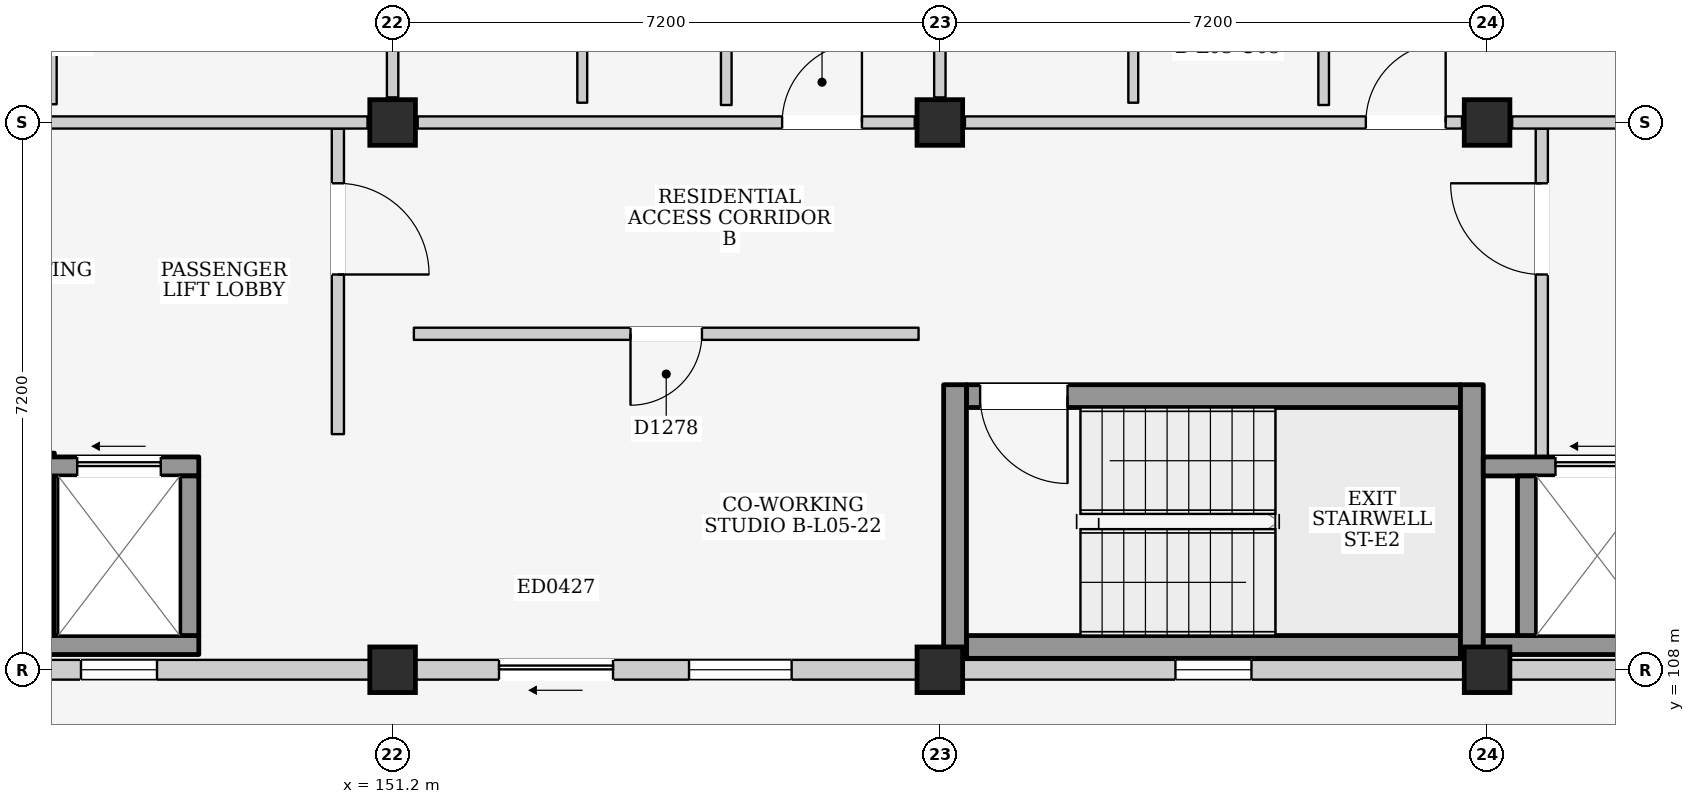
"""IFC4 building model, lengths in metres.
Left out: names, types, materials, properties, quantities, classifications, styles, units other than length and angle.
Written with IfcOpenShell. Run it as: python <this file> out.ifc"""

import sys

from ifc_helpers import new_model, si_unit, direction, frame, frame_2d, origin, origin_2d, place, context, subcontext, project, spatial, rectangle, extrude, element, fill, save


model = new_model("IFC4")
c1 = context("Model", 3, precision=1e-05, world=origin(), true_north=direction((0.0, 1.0)))
c2 = subcontext(c1, "Body", "Model", "MODEL_VIEW")
j1 = project(units=[si_unit("LENGTHUNIT", "METRE"), si_unit("PLANEANGLEUNIT", "RADIAN")], contexts=[c1])
p1 = place(None, origin())
s1 = spatial("IfcSite", under=j1, at=p1, CompositionType="ELEMENT")
p2 = place(p1, origin())
s2 = spatial("IfcBuilding", under=s1, at=p2, CompositionType="ELEMENT")
p3 = place(p2, frame((0.0, 0.0, 18.6)))
s3 = spatial("IfcBuildingStorey", under=s2, at=p3, CompositionType="ELEMENT", Elevation=18.6)
for number, where, z_axis, x_axis in (
    (1, (151.2, 108.0, 0.0), (0.0, 0.0, 1.0), (1.0, 0.0, 0.0)),
    (2, (151.2, 115.2, 0.0), (0.0, 0.0, 1.0), (1.0, 0.0, 0.0)),
    (3, (158.4, 108.0, 0.0), (0.0, 0.0, 1.0), (1.0, 0.0, 0.0)),
    (4, (158.4, 115.2, 0.0), (0.0, 0.0, 1.0), (1.0, 0.0, 0.0)),
    (5, (165.6, 108.0, 0.0), (0.0, 0.0, 1.0), (1.0, 0.0, 0.0)),
    (6, (165.6, 115.2, 0.0), (0.0, 0.0, 1.0), (1.0, 0.0, 0.0)),
):
    element("IfcColumn", number, at=place(p3, frame(where, z_axis=z_axis, x_axis=x_axis)), inside=s3, PredefinedType="COLUMN", context=c2, shape_type="SweptSolid", body=[
        extrude(rectangle(XDim=0.6, YDim=0.6, at=origin_2d()), origin(), (0.0, 0.0, 1.0), 3.3),
    ])
p4 = place(p3, frame((144.3, 108.0, 0.0), z_axis=(0.0, 0.0, 1.0), x_axis=(1.0, 0.0, 0.0)))
e7 = element("IfcWall", 7, at=p4, inside=s3, PredefinedType="ELEMENTEDWALL", context=c2, shape_type="SweptSolid", body=[
    extrude(rectangle(XDim=6.6, YDim=0.26, at=frame_2d((3.3, 0.0))), origin(), (0.0, 0.0, 1.0), 2.445),
])
p5 = place(p4, frame((2.8, 0.0, 1.2)))
e8 = element("IfcOpeningElement", 8, at=p5, cuts=e7, PredefinedType="OPENING", context=c2, shape_type="SweptSolid", body=[
    extrude(rectangle(XDim=1.0, YDim=0.9, at=frame_2d((0.5, 0.45))), frame((0.0, 0.145, 0.0), z_axis=(0.0, -1.0, 0.0), x_axis=(1.0, 0.0, 0.0)), (0.0, 0.0, 1.0), 0.29),
])
p6 = place(p3, frame((151.5, 108.0, 0.0), z_axis=(0.0, 0.0, 1.0), x_axis=(1.0, 0.0, 0.0)))
e9 = element("IfcWall", 9, at=p6, inside=s3, PredefinedType="ELEMENTEDWALL", context=c2, shape_type="SweptSolid", body=[
    extrude(rectangle(XDim=6.6, YDim=0.26, at=frame_2d((3.3, 0.0))), origin(), (0.0, 0.0, 1.0), 2.445),
])
p7 = place(p6, frame((1.1, 0.0, 0.0)))
e10 = element("IfcOpeningElement", 10, at=p7, cuts=e9, PredefinedType="OPENING", context=c2, shape_type="SweptSolid", body=[
    extrude(rectangle(XDim=1.5, YDim=2.12, at=frame_2d((0.75, 1.06))), frame((0.0, 0.145, 0.0), z_axis=(0.0, -1.0, 0.0), x_axis=(1.0, 0.0, 0.0)), (0.0, 0.0, 1.0), 0.29),
])
p8 = place(p6, frame((3.6, 0.0, 0.835)))
e11 = element("IfcOpeningElement", 11, at=p8, cuts=e9, PredefinedType="OPENING", context=c2, shape_type="SweptSolid", body=[
    extrude(rectangle(XDim=1.35, YDim=1.5, at=frame_2d((0.675, 0.75))), frame((0.0, 0.145, 0.0), z_axis=(0.0, -1.0, 0.0), x_axis=(1.0, 0.0, 0.0)), (0.0, 0.0, 1.0), 0.29),
])
p9 = place(p3, frame((158.7, 108.0, 0.0), z_axis=(0.0, 0.0, 1.0), x_axis=(1.0, 0.0, 0.0)))
e12 = element("IfcWall", 12, at=p9, inside=s3, PredefinedType="ELEMENTEDWALL", context=c2, shape_type="SweptSolid", body=[
    extrude(rectangle(XDim=6.6, YDim=0.26, at=frame_2d((3.3, 0.0))), origin(), (0.0, 0.0, 1.0), 2.445),
])
p10 = place(p9, frame((2.8, 0.0, 1.2)))
e13 = element("IfcOpeningElement", 13, at=p10, cuts=e12, PredefinedType="OPENING", context=c2, shape_type="SweptSolid", body=[
    extrude(rectangle(XDim=1.0, YDim=0.9, at=frame_2d((0.5, 0.45))), frame((0.0, 0.145, 0.0), z_axis=(0.0, -1.0, 0.0), x_axis=(1.0, 0.0, 0.0)), (0.0, 0.0, 1.0), 0.29),
])
p11 = place(p3, frame((165.9, 108.0, 0.0), z_axis=(0.0, 0.0, 1.0), x_axis=(1.0, 0.0, 0.0)))
e14 = element("IfcWall", 14, at=p11, inside=s3, PredefinedType="ELEMENTEDWALL", context=c2, shape_type="SweptSolid", body=[
    extrude(rectangle(XDim=6.6, YDim=0.26, at=frame_2d((3.3, 0.0))), origin(), (0.0, 0.0, 1.0), 2.445),
])
p12 = place(p11, frame((2.8, 0.0, 1.2)))
e15 = element("IfcOpeningElement", 15, at=p12, cuts=e14, PredefinedType="OPENING", context=c2, shape_type="SweptSolid", body=[
    extrude(rectangle(XDim=1.0, YDim=0.9, at=frame_2d((0.5, 0.45))), frame((0.0, 0.145, 0.0), z_axis=(0.0, -1.0, 0.0), x_axis=(1.0, 0.0, 0.0)), (0.0, 0.0, 1.0), 0.29),
])
p13 = place(p3, frame((150.48, 111.1, 0.0), z_axis=(0.0, 0.0, 1.0), x_axis=(0.0, 1.0, 0.0)))
e16 = element("IfcWall", 16, at=p13, inside=s3, PredefinedType="PARTITIONING", context=c2, shape_type="SweptSolid", body=[
    extrude(rectangle(XDim=4.02, YDim=0.16, at=frame_2d((2.01, 0.0))), origin(), (0.0, 0.0, 1.0), 3.06),
])
p14 = place(p13, frame((2.1, 0.0, 0.0)))
e17 = element("IfcOpeningElement", 17, at=p14, cuts=e16, PredefinedType="OPENING", context=c2, shape_type="SweptSolid", body=[
    extrude(rectangle(XDim=1.2, YDim=2.2, at=frame_2d((0.6, 1.1))), frame((0.0, 0.095, 0.0), z_axis=(0.0, -1.0, 0.0), x_axis=(1.0, 0.0, 0.0)), (0.0, 0.0, 1.0), 0.19),
])
p15 = place(p3, frame((146.625, 108.45, 0.0), z_axis=(0.0, 0.0, 1.0), x_axis=(0.0, 1.0, 0.0)))
e18 = element("IfcWall", 18, at=p15, inside=s3, PredefinedType="SHEAR", context=c2, shape_type="SweptSolid", body=[
    extrude(rectangle(XDim=2.4, YDim=0.25, at=frame_2d((1.2, 0.0))), origin(), (0.0, 0.0, 1.0), 3.06),
])
p16 = place(p3, frame((146.625, 108.325, 0.0), z_axis=(0.0, 0.0, 1.0), x_axis=(1.0, 0.0, 0.0)))
e19 = element("IfcWall", 19, at=p16, inside=s3, PredefinedType="SHEAR", context=c2, shape_type="SweptSolid", body=[
    extrude(rectangle(XDim=2.025, YDim=0.25, at=frame_2d((1.012, 0.0))), origin(), (0.0, 0.0, 1.0), 3.06),
])
p17 = place(p3, frame((146.625, 110.675, 0.0), z_axis=(0.0, 0.0, 1.0), x_axis=(1.0, 0.0, 0.0)))
e20 = element("IfcWall", 20, at=p17, inside=s3, PredefinedType="SHEAR", context=c2, shape_type="SweptSolid", body=[
    extrude(rectangle(XDim=2.025, YDim=0.25, at=frame_2d((1.012, 0.0))), origin(), (0.0, 0.0, 1.0), 3.06),
])
p18 = place(p17, frame((0.425, 0.0, 0.0)))
e21 = element("IfcOpeningElement", 21, at=p18, cuts=e20, PredefinedType="OPENING", context=c2, shape_type="SweptSolid", body=[
    extrude(rectangle(XDim=1.1, YDim=2.15, at=frame_2d((0.55, 1.075))), frame((0.0, 0.14, 0.0), z_axis=(0.0, -1.0, 0.0), x_axis=(1.0, 0.0, 0.0)), (0.0, 0.0, 1.0), 0.28),
])
p19 = place(p3, frame((148.525, 108.45, 0.0), z_axis=(0.0, 0.0, 1.0), x_axis=(0.0, 1.0, 0.0)))
e22 = element("IfcWall", 22, at=p19, inside=s3, PredefinedType="SHEAR", context=c2, shape_type="SweptSolid", body=[
    extrude(rectangle(XDim=2.1, YDim=0.25, at=frame_2d((1.05, 0.0))), origin(), (0.0, 0.0, 1.0), 3.06),
])
p20 = place(p3, frame((158.75, 108.3, 0.0), z_axis=(0.0, 0.0, 1.0), x_axis=(1.0, 0.0, 0.0)))
e23 = element("IfcWall", 23, at=p20, inside=s3, PredefinedType="SHEAR", context=c2, shape_type="SweptSolid", body=[
    extrude(rectangle(XDim=6.5, YDim=0.3, at=frame_2d((3.25, 0.0))), origin(), (0.0, 0.0, 1.0), 3.06),
])
p21 = place(p3, frame((158.75, 111.6, 0.0), z_axis=(0.0, 0.0, 1.0), x_axis=(1.0, 0.0, 0.0)))
e24 = element("IfcWall", 24, at=p21, inside=s3, PredefinedType="SHEAR", context=c2, shape_type="SweptSolid", body=[
    extrude(rectangle(XDim=6.5, YDim=0.3, at=frame_2d((3.25, 0.0))), origin(), (0.0, 0.0, 1.0), 3.06),
])
p22 = place(p21, frame((0.18, 0.0, 0.0)))
e25 = element("IfcOpeningElement", 25, at=p22, cuts=e24, PredefinedType="OPENING", context=c2, shape_type="SweptSolid", body=[
    extrude(rectangle(XDim=1.15, YDim=2.2, at=frame_2d((0.575, 1.1))), frame((0.0, 0.165, 0.0), z_axis=(0.0, -1.0, 0.0), x_axis=(1.0, 0.0, 0.0)), (0.0, 0.0, 1.0), 0.33),
])
for number, where, z_axis, x_axis in (
    (26, (158.6, 108.15, 0.0), (0.0, 0.0, 1.0), (0.0, 1.0, 0.0)),
    (27, (165.4, 108.15, 0.0), (0.0, 0.0, 1.0), (0.0, 1.0, 0.0)),
):
    element("IfcWall", number, at=place(p3, frame(where, z_axis=z_axis, x_axis=x_axis)), inside=s3, PredefinedType="SHEAR", context=c2, shape_type="SweptSolid", body=[
        extrude(rectangle(XDim=3.6, YDim=0.3, at=frame_2d((1.8, 0.0))), origin(), (0.0, 0.0, 1.0), 3.06),
    ])
p23 = place(p3, frame((166.32, 110.8, 0.0), z_axis=(0.0, 0.0, 1.0), x_axis=(0.0, 1.0, 0.0)))
e28 = element("IfcWall", 28, at=p23, inside=s3, PredefinedType="PARTITIONING", context=c2, shape_type="SweptSolid", body=[
    extrude(rectangle(XDim=4.32, YDim=0.16, at=frame_2d((2.16, 0.0))), origin(), (0.0, 0.0, 1.0), 3.06),
])
p24 = place(p23, frame((2.4, 0.0, 0.0)))
e29 = element("IfcOpeningElement", 29, at=p24, cuts=e28, PredefinedType="OPENING", context=c2, shape_type="SweptSolid", body=[
    extrude(rectangle(XDim=1.2, YDim=2.2, at=frame_2d((0.6, 1.1))), frame((0.0, 0.095, 0.0), z_axis=(0.0, -1.0, 0.0), x_axis=(1.0, 0.0, 0.0)), (0.0, 0.0, 1.0), 0.19),
])
p25 = place(p3, frame((165.55, 108.325, 0.0), z_axis=(0.0, 0.0, 1.0), x_axis=(1.0, 0.0, 0.0)))
e30 = element("IfcWall", 30, at=p25, inside=s3, PredefinedType="SHEAR", context=c2, shape_type="SweptSolid", body=[
    extrude(rectangle(XDim=2.55, YDim=0.25, at=frame_2d((1.275, 0.0))), origin(), (0.0, 0.0, 1.0), 3.06),
])
p26 = place(p3, frame((165.55, 110.675, 0.0), z_axis=(0.0, 0.0, 1.0), x_axis=(1.0, 0.0, 0.0)))
e31 = element("IfcWall", 31, at=p26, inside=s3, PredefinedType="SHEAR", context=c2, shape_type="SweptSolid", body=[
    extrude(rectangle(XDim=2.55, YDim=0.25, at=frame_2d((1.275, 0.0))), origin(), (0.0, 0.0, 1.0), 3.06),
])
p27 = place(p26, frame((0.95, 0.0, 0.0)))
e32 = element("IfcOpeningElement", 32, at=p27, cuts=e31, PredefinedType="OPENING", context=c2, shape_type="SweptSolid", body=[
    extrude(rectangle(XDim=1.1, YDim=2.15, at=frame_2d((0.55, 1.075))), frame((0.0, 0.14, 0.0), z_axis=(0.0, -1.0, 0.0), x_axis=(1.0, 0.0, 0.0)), (0.0, 0.0, 1.0), 0.28),
])
p28 = place(p3, frame((166.125, 108.45, 0.0), z_axis=(0.0, 0.0, 1.0), x_axis=(0.0, 1.0, 0.0)))
e33 = element("IfcWall", 33, at=p28, inside=s3, PredefinedType="SHEAR", context=c2, shape_type="SweptSolid", body=[
    extrude(rectangle(XDim=2.1, YDim=0.25, at=frame_2d((1.05, 0.0))), origin(), (0.0, 0.0, 1.0), 3.06),
])
p29 = place(p3, frame((144.33, 115.2, 0.0), z_axis=(0.0, 0.0, 1.0), x_axis=(1.0, 0.0, 0.0)))
e34 = element("IfcWall", 34, at=p29, inside=s3, PredefinedType="PARTITIONING", context=c2, shape_type="SweptSolid", body=[
    extrude(rectangle(XDim=6.54, YDim=0.16, at=frame_2d((3.27, 0.0))), origin(), (0.0, 0.0, 1.0), 2.445),
])
p30 = place(p3, frame((151.2, 115.53, 0.0), z_axis=(0.0, 0.0, 1.0), x_axis=(0.0, 1.0, 0.0)))
e35 = element("IfcWall", 35, at=p30, inside=s3, PredefinedType="PARTITIONING", context=c2, shape_type="SweptSolid", body=[
    extrude(rectangle(XDim=6.54, YDim=0.15, at=frame_2d((3.27, 0.0))), origin(), (0.0, 0.0, 1.0), 2.545),
])
p31 = place(p3, frame((146.72, 115.44, 0.0), z_axis=(0.0, 0.0, 1.0), x_axis=(0.0, 1.0, 0.0)))
e36 = element("IfcWall", 36, at=p31, inside=s3, PredefinedType="PARTITIONING", context=c2, shape_type="SweptSolid", body=[
    extrude(rectangle(XDim=3.04, YDim=0.12, at=frame_2d((1.52, 0.0))), origin(), (0.0, 0.0, 1.0), 3.06),
])
p32 = place(p31, frame((1.04, 0.0, 0.0)))
e37 = element("IfcOpeningElement", 37, at=p32, cuts=e36, PredefinedType="OPENING", context=c2, shape_type="SweptSolid", body=[
    extrude(rectangle(XDim=0.96, YDim=2.15, at=frame_2d((0.48, 1.075))), frame((0.0, 0.075, 0.0), z_axis=(0.0, -1.0, 0.0), x_axis=(1.0, 0.0, 0.0)), (0.0, 0.0, 1.0), 0.15),
])
p33 = place(p3, frame((151.53, 115.2, 0.0), z_axis=(0.0, 0.0, 1.0), x_axis=(1.0, 0.0, 0.0)))
e38 = element("IfcWall", 38, at=p33, inside=s3, PredefinedType="PARTITIONING", context=c2, shape_type="SweptSolid", body=[
    extrude(rectangle(XDim=6.54, YDim=0.16, at=frame_2d((3.27, 0.0))), origin(), (0.0, 0.0, 1.0), 2.445),
])
p34 = place(p33, frame((4.795, 0.0, 0.0)))
e39 = element("IfcOpeningElement", 39, at=p34, cuts=e38, PredefinedType="OPENING", context=c2, shape_type="SweptSolid", body=[
    extrude(rectangle(XDim=1.05, YDim=2.15, at=frame_2d((0.525, 1.075))), frame((0.0, 0.095, 0.0), z_axis=(0.0, -1.0, 0.0), x_axis=(1.0, 0.0, 0.0)), (0.0, 0.0, 1.0), 0.19),
])
p35 = place(p3, frame((158.4, 115.53, 0.0), z_axis=(0.0, 0.0, 1.0), x_axis=(0.0, 1.0, 0.0)))
e40 = element("IfcWall", 40, at=p35, inside=s3, PredefinedType="PARTITIONING", context=c2, shape_type="SweptSolid", body=[
    extrude(rectangle(XDim=6.54, YDim=0.15, at=frame_2d((3.27, 0.0))), origin(), (0.0, 0.0, 1.0), 2.545),
])
p36 = place(p3, frame((153.695, 115.46, 0.0), z_axis=(0.0, 0.0, 1.0), x_axis=(0.0, 1.0, 0.0)))
e41 = element("IfcWall", 41, at=p36, inside=s3, PredefinedType="PARTITIONING", context=c2, shape_type="SweptSolid", body=[
    extrude(rectangle(XDim=2.33, YDim=0.13, at=frame_2d((1.165, 0.0))), origin(), (0.0, 0.0, 1.0), 3.06),
])
p37 = place(p3, frame((155.59, 115.43, 0.0), z_axis=(0.0, 0.0, 1.0), x_axis=(0.0, 1.0, 0.0)))
e42 = element("IfcWall", 42, at=p37, inside=s3, PredefinedType="PARTITIONING", context=c2, shape_type="SweptSolid", body=[
    extrude(rectangle(XDim=2.35, YDim=0.14, at=frame_2d((1.175, 0.0))), origin(), (0.0, 0.0, 1.0), 3.06),
])
p38 = place(p3, frame((158.73, 115.2, 0.0), z_axis=(0.0, 0.0, 1.0), x_axis=(1.0, 0.0, 0.0)))
e43 = element("IfcWall", 43, at=p38, inside=s3, PredefinedType="PARTITIONING", context=c2, shape_type="SweptSolid", body=[
    extrude(rectangle(XDim=6.54, YDim=0.16, at=frame_2d((3.27, 0.0))), origin(), (0.0, 0.0, 1.0), 2.445),
])
p39 = place(p38, frame((5.275, 0.0, 0.0)))
e44 = element("IfcOpeningElement", 44, at=p39, cuts=e43, PredefinedType="OPENING", context=c2, shape_type="SweptSolid", body=[
    extrude(rectangle(XDim=1.05, YDim=2.15, at=frame_2d((0.525, 1.075))), frame((0.0, 0.095, 0.0), z_axis=(0.0, -1.0, 0.0), x_axis=(1.0, 0.0, 0.0)), (0.0, 0.0, 1.0), 0.19),
])
p40 = place(p3, frame((165.93, 115.2, 0.0), z_axis=(0.0, 0.0, 1.0), x_axis=(1.0, 0.0, 0.0)))
e45 = element("IfcWall", 45, at=p40, inside=s3, PredefinedType="PARTITIONING", context=c2, shape_type="SweptSolid", body=[
    extrude(rectangle(XDim=6.54, YDim=0.16, at=frame_2d((3.27, 0.0))), origin(), (0.0, 0.0, 1.0), 2.445),
])
p41 = place(p3, frame((160.945, 115.46, 0.0), z_axis=(0.0, 0.0, 1.0), x_axis=(0.0, 1.0, 0.0)))
e46 = element("IfcWall", 46, at=p41, inside=s3, PredefinedType="PARTITIONING", context=c2, shape_type="SweptSolid", body=[
    extrude(rectangle(XDim=3.04, YDim=0.13, at=frame_2d((1.52, 0.0))), origin(), (0.0, 0.0, 1.0), 3.06),
])
p42 = place(p3, frame((163.45, 115.43, 0.0), z_axis=(0.0, 0.0, 1.0), x_axis=(0.0, 1.0, 0.0)))
e47 = element("IfcWall", 47, at=p42, inside=s3, PredefinedType="PARTITIONING", context=c2, shape_type="SweptSolid", body=[
    extrude(rectangle(XDim=3.06, YDim=0.14, at=frame_2d((1.53, 0.0))), origin(), (0.0, 0.0, 1.0), 3.06),
])
p43 = place(p3, frame((151.48, 112.42, 0.0), z_axis=(0.0, 0.0, 1.0), x_axis=(1.0, 0.0, 0.0)))
e48 = element("IfcWall", 48, at=p43, inside=s3, PredefinedType="PARTITIONING", context=c2, shape_type="SweptSolid", body=[
    extrude(rectangle(XDim=6.64, YDim=0.16, at=frame_2d((3.32, 0.0))), origin(), (0.0, 0.0, 1.0), 3.06),
])
p44 = place(p43, frame((2.85, 0.0, 0.0)))
e49 = element("IfcOpeningElement", 49, at=p44, cuts=e48, PredefinedType="OPENING", context=c2, shape_type="SweptSolid", body=[
    extrude(rectangle(XDim=0.94, YDim=2.12, at=frame_2d((0.47, 1.06))), frame((0.0, 0.095, 0.0), z_axis=(0.0, -1.0, 0.0), x_axis=(1.0, 0.0, 0.0)), (0.0, 0.0, 1.0), 0.19),
])
p45 = place(p5, origin())
e50 = element("IfcWindow", 50, at=p45, inside=s3, PartitioningType="SINGLE_PANEL", PredefinedType="WINDOW", context=c2, shape_type="SweptSolid", body=[
    extrude(rectangle(XDim=1.0, YDim=0.9, at=frame_2d((0.5, 0.45))), frame((0.0, 0.03, 0.0), z_axis=(0.0, -1.0, 0.0), x_axis=(1.0, 0.0, 0.0)), (0.0, 0.0, 1.0), 0.06),
])
fill(e8, e50)
p46 = place(p7, frame((1.5, 0.0, 0.0), z_axis=(0.0, 0.0, 1.0), x_axis=(-1.0, 0.0, 0.0)))
e51 = element("IfcDoor", 51, at=p46, inside=s3, OperationType="SLIDING_TO_LEFT", PredefinedType="DOOR", context=c2, shape_type="SweptSolid", body=[
    extrude(rectangle(XDim=1.5, YDim=2.12, at=frame_2d((0.75, 1.06))), frame((0.0, 0.025, 0.0), z_axis=(0.0, -1.0, 0.0), x_axis=(1.0, 0.0, 0.0)), (0.0, 0.0, 1.0), 0.05),
])
fill(e10, e51)
p47 = place(p8, origin())
e52 = element("IfcWindow", 52, at=p47, inside=s3, PartitioningType="SINGLE_PANEL", PredefinedType="WINDOW", context=c2, shape_type="SweptSolid", body=[
    extrude(rectangle(XDim=1.35, YDim=1.5, at=frame_2d((0.675, 0.75))), frame((0.0, 0.03, 0.0), z_axis=(0.0, -1.0, 0.0), x_axis=(1.0, 0.0, 0.0)), (0.0, 0.0, 1.0), 0.06),
])
fill(e11, e52)
p48 = place(p10, origin())
e53 = element("IfcWindow", 53, at=p48, inside=s3, PartitioningType="SINGLE_PANEL", PredefinedType="WINDOW", context=c2, shape_type="SweptSolid", body=[
    extrude(rectangle(XDim=1.0, YDim=0.9, at=frame_2d((0.5, 0.45))), frame((0.0, 0.03, 0.0), z_axis=(0.0, -1.0, 0.0), x_axis=(1.0, 0.0, 0.0)), (0.0, 0.0, 1.0), 0.06),
])
fill(e13, e53)
p49 = place(p14, frame((1.2, 0.0, 0.0), z_axis=(0.0, 0.0, 1.0), x_axis=(-1.0, 0.0, 0.0)))
e54 = element("IfcDoor", 54, at=p49, inside=s3, OperationType="SINGLE_SWING_RIGHT", PredefinedType="DOOR", context=c2, shape_type="SweptSolid", body=[
    extrude(rectangle(XDim=1.2, YDim=2.2, at=frame_2d((0.6, 1.1))), frame((0.0, 0.025, 0.0), z_axis=(0.0, -1.0, 0.0), x_axis=(1.0, 0.0, 0.0)), (0.0, 0.0, 1.0), 0.05),
])
fill(e17, e54)
p50 = place(p18, origin())
e55 = element("IfcDoor", 55, at=p50, inside=s3, OperationType="SLIDING_TO_LEFT", PredefinedType="DOOR", context=c2, shape_type="SweptSolid", body=[
    extrude(rectangle(XDim=1.1, YDim=2.15, at=frame_2d((0.55, 1.075))), frame((0.0, 0.025, 0.0), z_axis=(0.0, -1.0, 0.0), x_axis=(1.0, 0.0, 0.0)), (0.0, 0.0, 1.0), 0.05),
])
fill(e21, e55)
p51 = place(p22, frame((1.15, 0.0, 0.0), z_axis=(0.0, 0.0, 1.0), x_axis=(-1.0, 0.0, 0.0)))
e56 = element("IfcDoor", 56, at=p51, inside=s3, OperationType="SINGLE_SWING_LEFT", PredefinedType="DOOR", context=c2, shape_type="SweptSolid", body=[
    extrude(rectangle(XDim=1.15, YDim=2.2, at=frame_2d((0.575, 1.1))), frame((0.0, 0.025, 0.0), z_axis=(0.0, -1.0, 0.0), x_axis=(1.0, 0.0, 0.0)), (0.0, 0.0, 1.0), 0.05),
])
fill(e25, e56)
p52 = place(p24, origin())
e57 = element("IfcDoor", 57, at=p52, inside=s3, OperationType="SINGLE_SWING_RIGHT", PredefinedType="DOOR", context=c2, shape_type="SweptSolid", body=[
    extrude(rectangle(XDim=1.2, YDim=2.2, at=frame_2d((0.6, 1.1))), frame((0.0, 0.025, 0.0), z_axis=(0.0, -1.0, 0.0), x_axis=(1.0, 0.0, 0.0)), (0.0, 0.0, 1.0), 0.05),
])
fill(e29, e57)
p53 = place(p27, origin())
e58 = element("IfcDoor", 58, at=p53, inside=s3, OperationType="SLIDING_TO_LEFT", PredefinedType="DOOR", context=c2, shape_type="SweptSolid", body=[
    extrude(rectangle(XDim=1.1, YDim=2.15, at=frame_2d((0.55, 1.075))), frame((0.0, 0.025, 0.0), z_axis=(0.0, -1.0, 0.0), x_axis=(1.0, 0.0, 0.0)), (0.0, 0.0, 1.0), 0.05),
])
fill(e32, e58)
p54 = place(p34, origin())
e59 = element("IfcDoor", 59, at=p54, inside=s3, OperationType="SINGLE_SWING_RIGHT", PredefinedType="DOOR", context=c2, shape_type="SweptSolid", body=[
    extrude(rectangle(XDim=1.05, YDim=2.15, at=frame_2d((0.525, 1.075))), frame((0.0, 0.025, 0.0), z_axis=(0.0, -1.0, 0.0), x_axis=(1.0, 0.0, 0.0)), (0.0, 0.0, 1.0), 0.05),
])
fill(e39, e59)
p55 = place(p39, origin())
e60 = element("IfcDoor", 60, at=p55, inside=s3, OperationType="SINGLE_SWING_RIGHT", PredefinedType="DOOR", context=c2, shape_type="SweptSolid", body=[
    extrude(rectangle(XDim=1.05, YDim=2.15, at=frame_2d((0.525, 1.075))), frame((0.0, 0.025, 0.0), z_axis=(0.0, -1.0, 0.0), x_axis=(1.0, 0.0, 0.0)), (0.0, 0.0, 1.0), 0.05),
])
fill(e44, e60)
p56 = place(p44, frame((0.94, 0.0, 0.0), z_axis=(0.0, 0.0, 1.0), x_axis=(-1.0, 0.0, 0.0)))
e61 = element("IfcDoor", 61, at=p56, inside=s3, OperationType="SINGLE_SWING_RIGHT", PredefinedType="DOOR", context=c2, shape_type="SweptSolid", body=[
    extrude(rectangle(XDim=0.94, YDim=2.12, at=frame_2d((0.47, 1.06))), frame((0.0, 0.025, 0.0), z_axis=(0.0, -1.0, 0.0), x_axis=(1.0, 0.0, 0.0)), (0.0, 0.0, 1.0), 0.05),
])
fill(e49, e61)
save(model, sys.argv[1])
